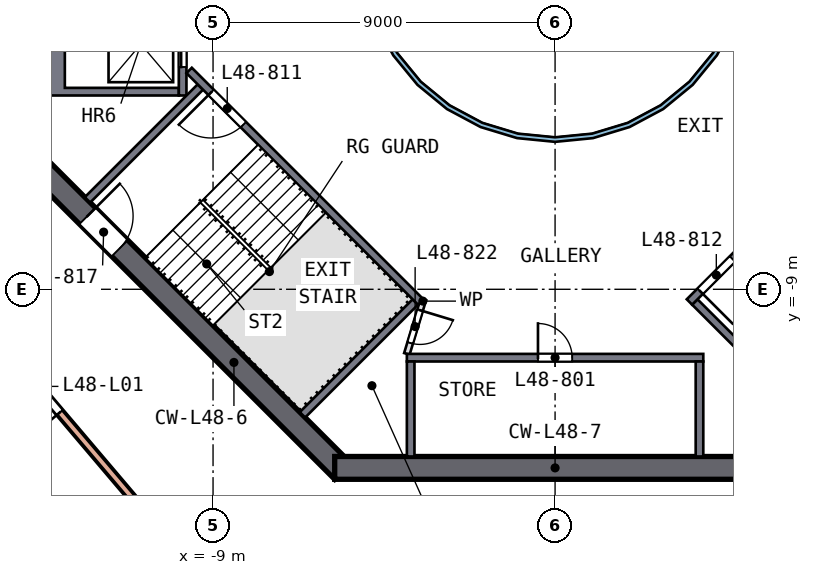
"""IFC4 building model, lengths in metres.
Left out: names, types, materials, properties, quantities, classifications, styles, units other than length and angle.
Written with IfcOpenShell. Run it as: python <this file> out.ifc"""

import sys

from ifc_helpers import new_model, si_unit, direction, frame, frame_2d, origin, place, context, subcontext, project, spatial, polyline, rectangle, outline, extrude, element, fill, save


model = new_model("IFC4")
c1 = context("Model", 3, precision=1e-05, world=origin(), true_north=direction((0.0, 1.0)))
c2 = subcontext(c1, "Body", "Model", "MODEL_VIEW")
j1 = project(units=[si_unit("LENGTHUNIT", "METRE"), si_unit("PLANEANGLEUNIT", "RADIAN")], contexts=[c1])
p1 = place(None, origin())
s1 = spatial("IfcSite", under=j1, at=p1, CompositionType="ELEMENT")
p2 = place(p1, origin())
s2 = spatial("IfcBuilding", under=s1, at=p2, CompositionType="ELEMENT")
p3 = place(p2, frame((0.0, 0.0, 197.5)))
s3 = spatial("IfcBuildingStorey", under=s2, at=p3, CompositionType="ELEMENT", Elevation=197.5)
p4 = place(p3, frame((-13.788, -5.587, 0.0), z_axis=(0.0, 0.0, 1.0), x_axis=(0.707106781, -0.707106781, 0.0)))
e1 = element("IfcWall", 1, at=p4, inside=s3, PredefinedType="SHEAR", context=c2, shape_type="SweptSolid", body=[
    extrude(rectangle(XDim=11.598, YDim=0.6, at=frame_2d((5.799, 0.0))), origin(), (0.0, 0.0, 1.0), 3.5),
])
p5 = place(p4, frame((2.099, 0.0, 0.0)))
e2 = element("IfcOpeningElement", 2, at=p5, cuts=e1, PredefinedType="OPENING", context=c2, shape_type="SweptSolid", body=[
    extrude(rectangle(XDim=1.2, YDim=2.1, at=frame_2d((0.6, 1.05))), frame((0.0, 0.31, 0.0), z_axis=(0.0, -1.0, 0.0), x_axis=(1.0, 0.0, 0.0)), (0.0, 0.0, 1.0), 0.62),
])
p6 = place(p3, frame((-5.799, -13.7, 0.0), z_axis=(0.0, 0.0, 1.0), x_axis=(1.0, 0.0, 0.0)))
e3 = element("IfcWall", 3, at=p6, inside=s3, PredefinedType="SHEAR", context=c2, shape_type="SweptSolid", body=[
    extrude(rectangle(XDim=11.598, YDim=0.6, at=frame_2d((5.799, 0.0))), origin(), (0.0, 0.0, 1.0), 3.5),
])
p7 = place(p3, frame((-9.41, -16.511, 0.0), z_axis=(0.0, 0.0, 1.0), x_axis=(-0.647046931, 0.762450175, 0.0)))
e4 = element("IfcWall", 4, at=p7, inside=s3, PredefinedType="SOLIDWALL", context=c2, shape_type="SweptSolid", body=[
    extrude(rectangle(XDim=13.0, YDim=0.2, at=frame_2d((6.5, 0.0))), origin(), (0.0, 0.0, 1.0), 3.19),
])
p8 = place(p7, frame((5.6, 0.0, 0.0)))
e5 = element("IfcOpeningElement", 5, at=p8, cuts=e4, PredefinedType="OPENING", context=c2, shape_type="SweptSolid", body=[
    extrude(rectangle(XDim=1.8, YDim=2.4, at=frame_2d((0.9, 1.2))), frame((0.0, 0.11, 0.0), z_axis=(0.0, -1.0, 0.0), x_axis=(1.0, 0.0, 0.0)), (0.0, 0.0, 1.0), 0.22),
])
p9 = place(p3, origin())
e6 = element("IfcWall", 6, at=p9, inside=s3, PredefinedType="SOLIDWALL", context=c2, shape_type="SweptSolid", body=[
    extrude(outline(polyline([(-13.4, -3.9), (-13.4, -1.2), (-9.9, -1.2), (-9.9, -1.4), (-12.9, -1.4), (-12.9, -3.7), (-9.9, -3.7), (-9.9, -3.9), (-13.4, -3.9)])), origin(), (0.0, 0.0, 1.0), 3.19),
])
p10 = place(p3, frame((-9.8, -1.2, 0.0), z_axis=(0.0, 0.0, 1.0), x_axis=(0.0, -1.0, 0.0)))
e7 = element("IfcWall", 7, at=p10, inside=s3, PredefinedType="SOLIDWALL", context=c2, shape_type="SweptSolid", body=[
    extrude(rectangle(XDim=2.7, YDim=0.2, at=frame_2d((1.35, 0.0))), origin(), (0.0, 0.0, 1.0), 3.19),
])
p11 = place(p10, frame((0.75, 0.0, 0.0)))
e8 = element("IfcOpeningElement", 8, at=p11, cuts=e7, PredefinedType="OPENING", context=c2, shape_type="SweptSolid", body=[
    extrude(rectangle(XDim=1.2, YDim=2.1, at=frame_2d((0.6, 1.05))), frame((0.0, 0.11, 0.0), z_axis=(0.0, -1.0, 0.0), x_axis=(1.0, 0.0, 0.0)), (0.0, 0.0, 1.0), 0.22),
])
p12 = place(p3, frame((-3.9, -10.8, 0.0), z_axis=(0.0, 0.0, 1.0), x_axis=(1.0, 0.0, 0.0)))
e9 = element("IfcWall", 9, at=p12, inside=s3, PredefinedType="SOLIDWALL", context=c2, shape_type="SweptSolid", body=[
    extrude(rectangle(XDim=7.8, YDim=0.2, at=frame_2d((3.9, 0.0))), origin(), (0.0, 0.0, 1.0), 3.19),
])
p13 = place(p12, frame((3.45, 0.0, 0.0)))
e10 = element("IfcOpeningElement", 10, at=p13, cuts=e9, PredefinedType="OPENING", context=c2, shape_type="SweptSolid", body=[
    extrude(rectangle(XDim=0.9, YDim=2.1, at=frame_2d((0.45, 1.05))), frame((0.0, 0.11, 0.0), z_axis=(0.0, -1.0, 0.0), x_axis=(1.0, 0.0, 0.0)), (0.0, 0.0, 1.0), 0.22),
])
for number, where, z_axis, x_axis in (
    (11, (-3.8, -10.9, 0.0), (0.0, 0.0, 1.0), (0.0, -1.0, 0.0)),
    (12, (3.8, -10.9, 0.0), (0.0, 0.0, 1.0), (0.0, -1.0, 0.0)),
):
    element("IfcWall", number, at=place(p3, frame(where, z_axis=z_axis, x_axis=x_axis)), inside=s3, PredefinedType="SOLIDWALL", context=c2, shape_type="SweptSolid", body=[
        extrude(rectangle(XDim=2.5, YDim=0.2, at=frame_2d((1.25, 0.0))), origin(), (0.0, 0.0, 1.0), 3.19),
    ])
p14 = place(p3, frame((-3.535, -9.334, 0.0), z_axis=(0.0, 0.0, 1.0), x_axis=(-0.707120946, 0.707092617, 0.0)))
e13 = element("IfcWall", 13, at=p14, inside=s3, PredefinedType="SOLIDWALL", context=c2, shape_type="SweptSolid", body=[
    extrude(rectangle(XDim=8.618, YDim=0.2, at=frame_2d((4.309, 0.0))), origin(), (0.0, 0.0, 1.0), 3.19),
])
p15 = place(p14, frame((6.6, 0.0, 0.0)))
e14 = element("IfcOpeningElement", 14, at=p15, cuts=e13, PredefinedType="OPENING", context=c2, shape_type="SweptSolid", body=[
    extrude(rectangle(XDim=1.2, YDim=2.1, at=frame_2d((0.6, 1.05))), frame((0.0, 0.11, 0.0), z_axis=(0.0, -1.0, 0.0), x_axis=(1.0, 0.0, 0.0)), (0.0, 0.0, 1.0), 0.22),
])
for number, where, z_axis, x_axis in (
    (15, (-9.334, -3.677, 0.0), (0.0, 0.0, 1.0), (-0.707, -0.707, 0.0)),
    (16, (-3.677, -9.334, 0.0), (0.0, 0.0, 1.0), (-0.707, -0.707, 0.0)),
):
    element("IfcWall", number, at=place(p3, frame(where, z_axis=z_axis, x_axis=x_axis)), inside=s3, PredefinedType="SOLIDWALL", context=c2, shape_type="SweptSolid", body=[
        extrude(rectangle(XDim=4.2, YDim=0.2, at=frame_2d((2.1, 0.0))), origin(), (0.0, 0.0, 1.0), 3.19),
    ])
p16 = place(p3, frame((9.629, -3.24, 0.0), z_axis=(0.0, 0.0, 1.0), x_axis=(-0.707120946, -0.707092617, 0.0)))
e17 = element("IfcWall", 17, at=p16, inside=s3, PredefinedType="SOLIDWALL", context=c2, shape_type="SweptSolid", body=[
    extrude(rectangle(XDim=8.618, YDim=0.2, at=frame_2d((4.309, 0.0))), origin(), (0.0, 0.0, 1.0), 3.19),
])
p17 = place(p16, frame((7.018, 0.0, 0.0)))
e18 = element("IfcOpeningElement", 18, at=p17, cuts=e17, PredefinedType="OPENING", context=c2, shape_type="SweptSolid", body=[
    extrude(rectangle(XDim=1.2, YDim=2.1, at=frame_2d((0.6, 1.05))), frame((0.0, 0.11, 0.0), z_axis=(0.0, -1.0, 0.0), x_axis=(1.0, 0.0, 0.0)), (0.0, 0.0, 1.0), 0.22),
])
p18 = place(p3, frame((3.677, -9.334, 0.0), z_axis=(0.0, 0.0, 1.0), x_axis=(0.707077716, -0.707135845, 0.0)))
e19 = element("IfcWall", 19, at=p18, inside=s3, PredefinedType="SOLIDWALL", context=c2, shape_type="SweptSolid", body=[
    extrude(rectangle(XDim=4.2, YDim=0.2, at=frame_2d((2.1, 0.0))), origin(), (0.0, 0.0, 1.0), 3.19),
])
p19 = place(p3, frame((-3.465, -9.263, 0.0), z_axis=(0.0, 0.0, 1.0), x_axis=(-0.289808785, -0.957084567, 0.0)))
e20 = element("IfcWall", 20, at=p19, inside=s3, PredefinedType="PARTITIONING", context=c2, shape_type="SweptSolid", body=[
    extrude(rectangle(XDim=1.501, YDim=0.15, at=frame_2d((0.75, 0.0))), origin(), (0.0, 0.0, 1.0), 3.19),
])
p20 = place(p19, frame((0.301, 0.0, 0.0)))
e21 = element("IfcOpeningElement", 21, at=p20, cuts=e20, PredefinedType="OPENING", context=c2, shape_type="SweptSolid", body=[
    extrude(rectangle(XDim=0.9, YDim=2.1, at=frame_2d((0.45, 1.05))), frame((0.0, 0.085, 0.0), z_axis=(0.0, -1.0, 0.0), x_axis=(1.0, 0.0, 0.0)), (0.0, 0.0, 1.0), 0.17),
])
p21 = place(p3, origin())
e22 = element("IfcWall", 22, at=p21, inside=s3, PredefinedType="SOLIDWALL", context=c2, shape_type="SweptSolid", body=[
    extrude(outline(polyline([(5.021, -0.999), (4.73, -1.959), (4.257, -2.844), (3.62, -3.62), (2.844, -4.257), (1.959, -4.73), (0.999, -5.021), (0.0, -5.12), (-0.999, -5.021), (-1.959, -4.73), (-2.844, -4.257), (-3.62, -3.62), (-4.257, -2.844), (-4.73, -1.959), (-5.021, -0.999), (-5.12, 0.0), (-5.021, 0.999), (-4.73, 1.959), (-4.257, 2.844), (-3.62, 3.62), (-2.844, 4.257), (-1.959, 4.73), (-0.999, 5.021), (0.0, 5.12), (0.999, 5.021), (1.959, 4.73), (2.844, 4.257), (3.62, 3.62), (4.257, 2.844), (4.73, 1.959), (5.021, 0.999), (5.12, 0.0), (5.021, -0.999)]), holes=[polyline([(4.904, 0.976), (4.619, 1.913), (4.157, 2.778), (3.535, 3.535), (2.778, 4.157), (1.913, 4.619), (0.976, 4.904), (0.0, 5.0), (-0.976, 4.904), (-1.913, 4.619), (-2.778, 4.157), (-3.535, 3.535), (-4.157, 2.778), (-4.619, 1.913), (-4.904, 0.976), (-5.0, 0.0), (-4.904, -0.976), (-4.619, -1.913), (-4.157, -2.778), (-3.535, -3.535), (-2.778, -4.157), (-1.913, -4.619), (-0.976, -4.904), (0.0, -5.0), (0.976, -4.904), (1.913, -4.619), (2.778, -4.157), (3.535, -3.535), (4.157, -2.778), (4.619, -1.913), (4.904, -0.976), (5.0, 0.0), (4.904, 0.976)])]), origin(), (0.0, 0.0, 1.0), 3.19),
])
p22 = place(p8, origin())
e23 = element("IfcDoor", 23, at=p22, inside=s3, OperationType="DOUBLE_DOOR_SINGLE_SWING", PredefinedType="DOOR", context=c2, shape_type="SweptSolid", body=[
    extrude(rectangle(XDim=1.8, YDim=2.4, at=frame_2d((0.9, 1.2))), frame((0.0, 0.025, 0.0), z_axis=(0.0, -1.0, 0.0), x_axis=(1.0, 0.0, 0.0)), (0.0, 0.0, 1.0), 0.05),
])
fill(e5, e23)
p23 = place(p13, origin())
e24 = element("IfcDoor", 24, at=p23, inside=s3, OperationType="SINGLE_SWING_LEFT", PredefinedType="DOOR", context=c2, shape_type="SweptSolid", body=[
    extrude(rectangle(XDim=0.9, YDim=2.1, at=frame_2d((0.45, 1.05))), frame((0.0, 0.025, 0.0), z_axis=(0.0, -1.0, 0.0), x_axis=(1.0, 0.0, 0.0)), (0.0, 0.0, 1.0), 0.05),
])
fill(e10, e24)
p24 = place(p11, origin())
e25 = element("IfcDoor", 25, at=p24, inside=s3, OperationType="DOUBLE_DOOR_SLIDING", PredefinedType="DOOR", context=c2, shape_type="SweptSolid", body=[
    extrude(rectangle(XDim=1.2, YDim=2.1, at=frame_2d((0.6, 1.05))), frame((0.0, 0.025, 0.0), z_axis=(0.0, -1.0, 0.0), x_axis=(1.0, 0.0, 0.0)), (0.0, 0.0, 1.0), 0.05),
])
fill(e8, e25)
p25 = place(p15, origin())
e26 = element("IfcDoor", 26, at=p25, inside=s3, OperationType="SINGLE_SWING_RIGHT", PredefinedType="DOOR", context=c2, shape_type="SweptSolid", body=[
    extrude(rectangle(XDim=1.2, YDim=2.1, at=frame_2d((0.6, 1.05))), frame((0.0, 0.025, 0.0), z_axis=(0.0, -1.0, 0.0), x_axis=(1.0, 0.0, 0.0)), (0.0, 0.0, 1.0), 0.05),
])
fill(e14, e26)
p26 = place(p17, origin())
e27 = element("IfcDoor", 27, at=p26, inside=s3, OperationType="SINGLE_SWING_RIGHT", PredefinedType="DOOR", context=c2, shape_type="SweptSolid", body=[
    extrude(rectangle(XDim=1.2, YDim=2.1, at=frame_2d((0.6, 1.05))), frame((0.0, 0.025, 0.0), z_axis=(0.0, -1.0, 0.0), x_axis=(1.0, 0.0, 0.0)), (0.0, 0.0, 1.0), 0.05),
])
fill(e18, e27)
p27 = place(p5, origin())
e28 = element("IfcDoor", 28, at=p27, inside=s3, OperationType="SINGLE_SWING_LEFT", PredefinedType="DOOR", context=c2, shape_type="SweptSolid", body=[
    extrude(rectangle(XDim=1.2, YDim=2.1, at=frame_2d((0.6, 1.05))), frame((0.0, 0.025, 0.0), z_axis=(0.0, -1.0, 0.0), x_axis=(1.0, 0.0, 0.0)), (0.0, 0.0, 1.0), 0.05),
])
fill(e2, e28)
p28 = place(p20, origin())
e29 = element("IfcDoor", 29, at=p28, inside=s3, OperationType="SINGLE_SWING_LEFT", PredefinedType="DOOR", context=c2, shape_type="SweptSolid", body=[
    extrude(rectangle(XDim=0.9, YDim=2.1, at=frame_2d((0.45, 1.05))), frame((0.0, 0.025, 0.0), z_axis=(0.0, -1.0, 0.0), x_axis=(1.0, 0.0, 0.0)), (0.0, 0.0, 1.0), 0.05),
])
fill(e21, e29)
save(model, sys.argv[1])
